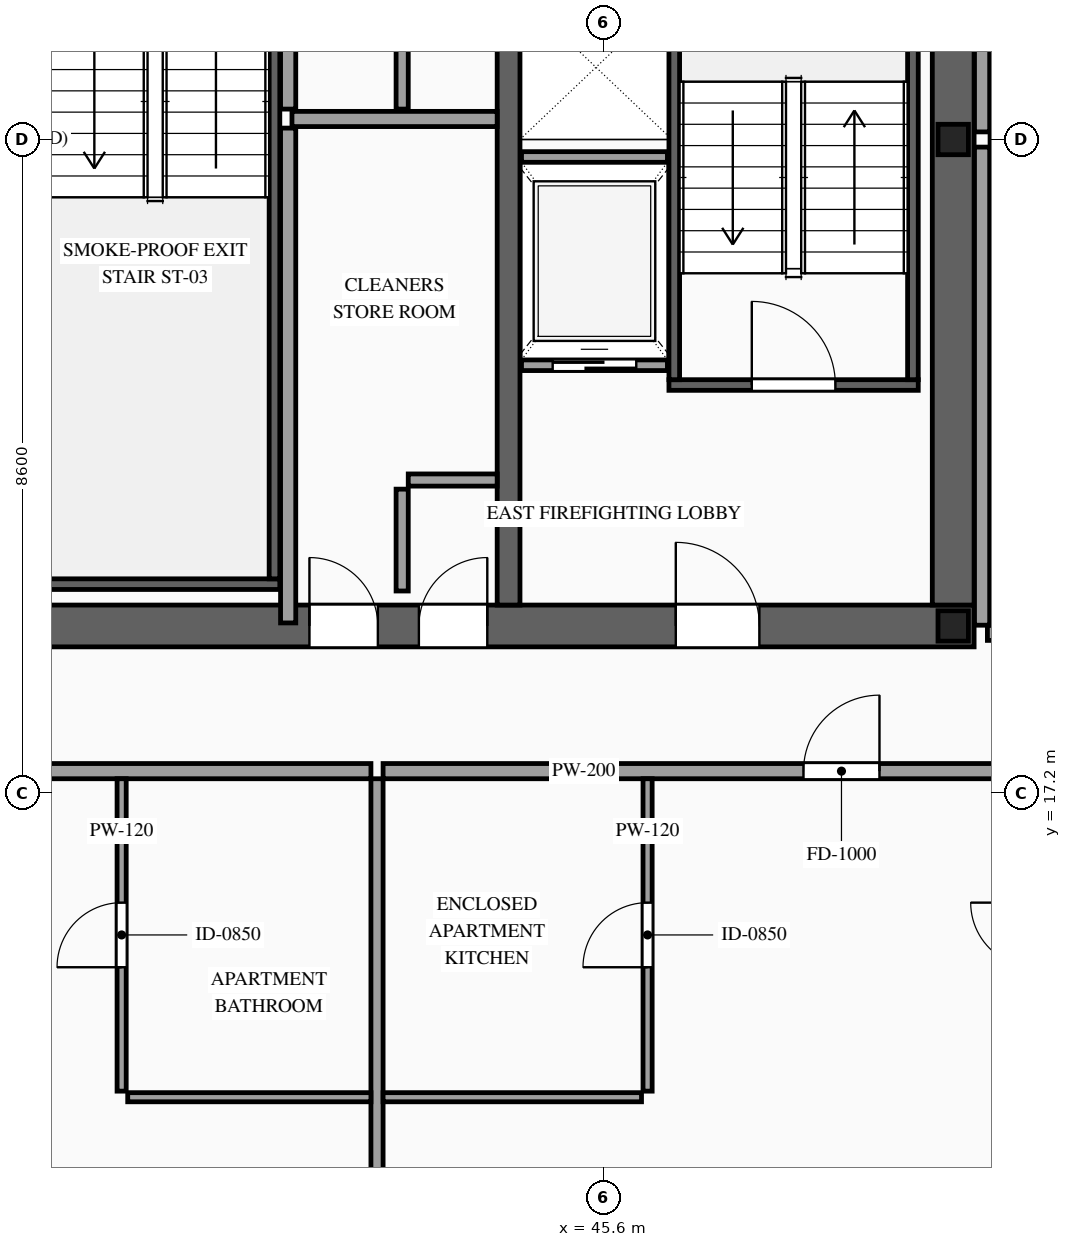
"""IFC4 building model, lengths in metres.
Left out: names, types, materials, properties, quantities, classifications, styles, units other than length and angle.
Written with IfcOpenShell. Run it as: python <this file> out.ifc"""

import sys

from ifc_helpers import new_model, si_unit, direction, frame, frame_2d, origin, origin_2d, place, context, subcontext, project, spatial, rectangle, i_section, extrude, source, transform, mapped, element, fill, save


model = new_model("IFC4")
c1 = context("Model", 3, precision=1e-05, world=origin(), true_north=direction((0.0, 1.0)))
c2 = subcontext(c1, "Body", "Model", "MODEL_VIEW")
j1 = project(units=[si_unit("LENGTHUNIT", "METRE"), si_unit("PLANEANGLEUNIT", "RADIAN")], contexts=[c1])
p1 = place(None, origin())
s1 = spatial("IfcSite", under=j1, at=p1, CompositionType="ELEMENT")
p2 = place(p1, origin())
s2 = spatial("IfcBuilding", under=s1, at=p2, CompositionType="ELEMENT")
p3 = place(p2, frame((0.0, 0.0, 234.6)))
s3 = spatial("IfcBuildingStorey", under=s2, at=p3, CompositionType="ELEMENT", Elevation=234.6)
p4 = place(p3, frame((23.525, 19.4, 0.0), z_axis=(0.0, 0.0, 1.0), x_axis=(1.0, 0.0, 0.0)))
e1 = element("IfcWall", 1, at=p4, inside=s3, PredefinedType="SHEAR", context=c2, shape_type="SweptSolid", body=[
    extrude(rectangle(XDim=26.95, YDim=0.55, at=frame_2d((13.475, 0.0))), origin(), (0.0, 0.0, 1.0), 3.5),
])
p5 = place(p4, frame((1.925, 0.0, 0.0)))
e2 = element("IfcOpeningElement", 2, at=p5, cuts=e1, PredefinedType="OPENING", context=c2, shape_type="SweptSolid", body=[
    extrude(rectangle(XDim=1.1, YDim=2.2, at=frame_2d((0.55, 1.1))), frame((0.0, 0.29, 0.0), z_axis=(0.0, -1.0, 0.0), x_axis=(1.0, 0.0, 0.0)), (0.0, 0.0, 1.0), 0.58),
])
p6 = place(p4, frame((9.825, 0.0, 0.0)))
e3 = element("IfcOpeningElement", 3, at=p6, cuts=e1, PredefinedType="OPENING", context=c2, shape_type="SweptSolid", body=[
    extrude(rectangle(XDim=1.1, YDim=2.2, at=frame_2d((0.55, 1.1))), frame((0.0, 0.29, 0.0), z_axis=(0.0, -1.0, 0.0), x_axis=(1.0, 0.0, 0.0)), (0.0, 0.0, 1.0), 0.58),
])
p7 = place(p4, frame((23.025, 0.0, 0.0)))
e4 = element("IfcOpeningElement", 4, at=p7, cuts=e1, PredefinedType="OPENING", context=c2, shape_type="SweptSolid", body=[
    extrude(rectangle(XDim=1.1, YDim=2.2, at=frame_2d((0.55, 1.1))), frame((0.0, 0.29, 0.0), z_axis=(0.0, -1.0, 0.0), x_axis=(1.0, 0.0, 0.0)), (0.0, 0.0, 1.0), 0.58),
])
p8 = place(p4, frame((19.645, 0.0, 0.0)))
e5 = element("IfcOpeningElement", 5, at=p8, cuts=e1, PredefinedType="OPENING", context=c2, shape_type="SweptSolid", body=[
    extrude(rectangle(XDim=0.9, YDim=2.15, at=frame_2d((0.45, 1.075))), frame((0.0, 0.29, 0.0), z_axis=(0.0, -1.0, 0.0), x_axis=(1.0, 0.0, 0.0)), (0.0, 0.0, 1.0), 0.58),
])
p9 = place(p4, frame((18.205, 0.0, 0.0)))
e6 = element("IfcOpeningElement", 6, at=p9, cuts=e1, PredefinedType="OPENING", context=c2, shape_type="SweptSolid", body=[
    extrude(rectangle(XDim=0.9, YDim=2.15, at=frame_2d((0.45, 1.075))), frame((0.0, 0.29, 0.0), z_axis=(0.0, -1.0, 0.0), x_axis=(1.0, 0.0, 0.0)), (0.0, 0.0, 1.0), 0.58),
])
m1 = source(origin(), c2, "Body", "SweptSolid", [
    extrude(rectangle(XDim=12.25, YDim=0.55, at=frame_2d((6.125, 0.0))), origin(), (0.0, 0.0, 1.0), 3.5),
])
p10 = place(p3, frame((50.2, 19.675, 0.0), z_axis=(0.0, 0.0, 1.0), x_axis=(0.0, 1.0, 0.0)))
e7 = element("IfcWall", 7, at=p10, inside=s3, PredefinedType="SHEAR", context=c2, shape_type="MappedRepresentation", body=[
    mapped(m1, transform((0.0, 0.0, 0.0), scale=1.0)),
])
m2 = source(origin(), c2, "Body", "SweptSolid", [
    extrude(rectangle(XDim=12.25, YDim=0.3, at=frame_2d((6.125, 0.0))), origin(), (0.0, 0.0, 1.0), 3.5),
])
p11 = place(p3, frame((44.35, 19.675, 0.0), z_axis=(0.0, 0.0, 1.0), x_axis=(0.0, 1.0, 0.0)))
e8 = element("IfcWall", 8, at=p11, inside=s3, PredefinedType="SOLIDWALL", context=c2, shape_type="MappedRepresentation", body=[
    mapped(m2, transform((0.0, 0.0, 0.0), scale=1.0)),
])
m3 = source(origin(), c2, "Body", "SweptSolid", [
    extrude(i_section(OverallWidth=0.4, OverallDepth=0.4, WebThickness=0.013, FlangeThickness=0.021, at=origin_2d()), origin(), (0.0, 0.0, 1.0), 3.5),
])
for number, where, z_axis, x_axis in (
    (9, (50.2, 19.4, 0.0), (0.0, 0.0, 1.0), (1.0, 0.0, 0.0)),
    (10, (50.2, 25.8, 0.0), (0.0, 0.0, 1.0), (1.0, 0.0, 0.0)),
):
    element("IfcColumn", number, at=place(p3, frame(where, z_axis=z_axis, x_axis=x_axis)), inside=s3, PredefinedType="COLUMN", context=c2, shape_type="MappedRepresentation", body=[
        mapped(m3, transform((0.0, 0.0, 0.0), scale=1.0)),
    ])
p12 = place(p3, frame((44.52, 22.83, 0.0), z_axis=(0.0, 0.0, 1.0), x_axis=(1.0, 0.0, 0.0)))
e11 = element("IfcWall", 11, at=p12, inside=s3, PredefinedType="SOLIDWALL", context=c2, shape_type="SweptSolid", body=[
    extrude(rectangle(XDim=1.92, YDim=0.14, at=frame_2d((0.96, 0.0))), origin(), (0.0, 0.0, 1.0), 3.28),
])
p13 = place(p12, frame((0.41, 0.0, 0.0)))
e12 = element("IfcOpeningElement", 12, at=p13, cuts=e11, PredefinedType="OPENING", context=c2, shape_type="SweptSolid", body=[
    extrude(rectangle(XDim=1.1, YDim=2.2, at=frame_2d((0.55, 1.1))), frame((0.0, 0.085, 0.0), z_axis=(0.0, -1.0, 0.0), x_axis=(1.0, 0.0, 0.0)), (0.0, 0.0, 1.0), 0.17),
])
m4 = source(origin(), c2, "Body", "SweptSolid", [
    extrude(rectangle(XDim=1.92, YDim=0.14, at=frame_2d((0.96, 0.0))), origin(), (0.0, 0.0, 1.0), 3.28),
])
p14 = place(p3, frame((44.52, 25.57, 0.0), z_axis=(0.0, 0.0, 1.0), x_axis=(1.0, 0.0, 0.0)))
e13 = element("IfcWall", 13, at=p14, inside=s3, PredefinedType="SOLIDWALL", context=c2, shape_type="MappedRepresentation", body=[
    mapped(m4, transform((0.0, 0.0, 0.0), scale=1.0)),
])
p15 = place(p3, frame((46.46, 22.57, 0.0), z_axis=(0.0, 0.0, 1.0), x_axis=(1.0, 0.0, 0.0)))
e14 = element("IfcWall", 14, at=p15, inside=s3, PredefinedType="SOLIDWALL", context=c2, shape_type="SweptSolid", body=[
    extrude(rectangle(XDim=3.28, YDim=0.14, at=frame_2d((1.64, 0.0))), origin(), (0.0, 0.0, 1.0), 3.28),
])
p16 = place(p15, frame((1.09, 0.0, 0.0)))
e15 = element("IfcOpeningElement", 15, at=p16, cuts=e14, PredefinedType="OPENING", context=c2, shape_type="SweptSolid", body=[
    extrude(rectangle(XDim=1.1, YDim=2.2, at=frame_2d((0.55, 1.1))), frame((0.0, 0.085, 0.0), z_axis=(0.0, -1.0, 0.0), x_axis=(1.0, 0.0, 0.0)), (0.0, 0.0, 1.0), 0.17),
])
m5 = source(origin(), c2, "Body", "SweptSolid", [
    extrude(rectangle(XDim=8.94, YDim=0.14, at=frame_2d((4.47, 0.0))), origin(), (0.0, 0.0, 1.0), 3.28),
])
for number, where, z_axis, x_axis in (
    (16, (46.53, 22.64, 0.0), (0.0, 0.0, 1.0), (0.0, 1.0, 0.0)),
    (17, (49.67, 22.64, 0.0), (0.0, 0.0, 1.0), (0.0, 1.0, 0.0)),
):
    element("IfcWall", number, at=place(p3, frame(where, z_axis=z_axis, x_axis=x_axis)), inside=s3, PredefinedType="SOLIDWALL", context=c2, shape_type="MappedRepresentation", body=[
        mapped(m5, transform((0.0, 0.0, 0.0), scale=1.0)),
    ])
m6 = source(origin(), c2, "Body", "SweptSolid", [
    extrude(rectangle(XDim=3.14, YDim=0.14, at=frame_2d((1.57, 0.0))), origin(), (0.0, 0.0, 1.0), 3.28),
])
p17 = place(p3, frame((38.2, 19.95, 0.0), z_axis=(0.0, 0.0, 1.0), x_axis=(1.0, 0.0, 0.0)))
e18 = element("IfcWall", 18, at=p17, inside=s3, PredefinedType="SOLIDWALL", context=c2, shape_type="MappedRepresentation", body=[
    mapped(m6, transform((0.0, 0.0, 0.0), scale=1.0)),
])
m7 = source(origin(), c2, "Body", "SweptSolid", [
    extrude(rectangle(XDim=8.94, YDim=0.14, at=frame_2d((4.47, 0.0))), origin(), (0.0, 0.0, 1.0), 3.28),
])
p18 = place(p3, frame((41.27, 20.02, 0.0), z_axis=(0.0, 0.0, 1.0), x_axis=(0.0, 1.0, 0.0)))
e19 = element("IfcWall", 19, at=p18, inside=s3, PredefinedType="SOLIDWALL", context=c2, shape_type="MappedRepresentation", body=[
    mapped(m7, transform((0.0, 0.0, 0.0), scale=1.0)),
])
m8 = source(origin(), c2, "Body", "SweptSolid", [
    extrude(rectangle(XDim=1.34, YDim=0.16, at=frame_2d((0.67, 0.0))), origin(), (0.0, 0.0, 1.0), 3.28),
])
p19 = place(p3, frame((42.95, 19.86, 0.0), z_axis=(0.0, 0.0, 1.0), x_axis=(0.0, 1.0, 0.0)))
e20 = element("IfcWall", 20, at=p19, inside=s3, PredefinedType="PARTITIONING", context=c2, shape_type="MappedRepresentation", body=[
    mapped(m8, transform((0.0, 0.0, 0.0), scale=1.0)),
])
m9 = source(origin(), c2, "Body", "SweptSolid", [
    extrude(rectangle(XDim=1.17, YDim=0.16, at=frame_2d((0.585, 0.0))), origin(), (0.0, 0.0, 1.0), 3.28),
])
p20 = place(p3, frame((43.03, 21.32, 0.0), z_axis=(0.0, 0.0, 1.0), x_axis=(1.0, 0.0, 0.0)))
e21 = element("IfcWall", 21, at=p20, inside=s3, PredefinedType="PARTITIONING", context=c2, shape_type="MappedRepresentation", body=[
    mapped(m9, transform((0.0, 0.0, 0.0), scale=1.0)),
])
m10 = source(origin(), c2, "Body", "SweptSolid", [
    extrude(rectangle(XDim=6.51, YDim=0.2, at=frame_2d((3.255, 0.0))), origin(), (0.0, 0.0, 1.0), 3.28),
])
p21 = place(p3, frame((41.45, 19.44, 0.0), z_axis=(0.0, 0.0, 1.0), x_axis=(0.0, 1.0, 0.0)))
e22 = element("IfcWall", 22, at=p21, inside=s3, PredefinedType="PARTITIONING", context=c2, shape_type="MappedRepresentation", body=[
    mapped(m10, transform((0.0, 0.0, 0.0), scale=1.0)),
])
m11 = source(origin(), c2, "Body", "SweptSolid", [
    extrude(rectangle(XDim=2.7, YDim=0.2, at=frame_2d((1.35, 0.0))), origin(), (0.0, 0.0, 1.0), 3.28),
])
p22 = place(p3, frame((41.5, 26.07, 0.0), z_axis=(0.0, 0.0, 1.0), x_axis=(1.0, 0.0, 0.0)))
e23 = element("IfcWall", 23, at=p22, inside=s3, PredefinedType="PARTITIONING", context=c2, shape_type="MappedRepresentation", body=[
    mapped(m11, transform((0.0, 0.0, 0.0), scale=1.0)),
])
m12 = source(origin(), c2, "Body", "SweptSolid", [
    extrude(rectangle(XDim=5.96, YDim=0.2, at=frame_2d((2.98, 0.0))), origin(), (0.0, 0.0, 1.0), 3.28),
])
p23 = place(p3, frame((41.45, 26.2, 0.0), z_axis=(0.0, 0.0, 1.0), x_axis=(0.0, 1.0, 0.0)))
e24 = element("IfcWall", 24, at=p23, inside=s3, PredefinedType="PARTITIONING", context=c2, shape_type="MappedRepresentation", body=[
    mapped(m12, transform((0.0, 0.0, 0.0), scale=1.0)),
])
m13 = source(origin(), c2, "Body", "SweptSolid", [
    extrude(rectangle(XDim=5.96, YDim=0.16, at=frame_2d((2.98, 0.0))), origin(), (0.0, 0.0, 1.0), 3.28),
])
p24 = place(p3, frame((42.95, 26.2, 0.0), z_axis=(0.0, 0.0, 1.0), x_axis=(0.0, 1.0, 0.0)))
e25 = element("IfcWall", 25, at=p24, inside=s3, PredefinedType="PARTITIONING", context=c2, shape_type="MappedRepresentation", body=[
    mapped(m13, transform((0.0, 0.0, 0.0), scale=1.0)),
])
p25 = place(p3, frame((31.11, 17.49, 0.0), z_axis=(0.0, 0.0, 1.0), x_axis=(1.0, 0.0, 0.0)))
e26 = element("IfcWall", 26, at=p25, inside=s3, PredefinedType="PARTITIONING", context=c2, shape_type="SweptSolid", body=[
    extrude(rectangle(XDim=11.429, YDim=0.2, at=frame_2d((5.714, 0.0))), origin(), (0.0, 0.0, 1.0), 3.28),
])
p26 = place(p25, frame((5.314, 0.0, 0.0)))
e27 = element("IfcOpeningElement", 27, at=p26, cuts=e26, PredefinedType="OPENING", context=c2, shape_type="SweptSolid", body=[
    extrude(rectangle(XDim=1.0, YDim=2.2, at=frame_2d((0.5, 1.1))), frame((0.0, 0.115, 0.0), z_axis=(0.0, -1.0, 0.0), x_axis=(1.0, 0.0, 0.0)), (0.0, 0.0, 1.0), 0.23),
])
m14 = source(origin(), c2, "Body", "SweptSolid", [
    extrude(rectangle(XDim=12.04, YDim=0.16, at=frame_2d((6.02, 0.0))), origin(), (0.0, 0.0, 1.0), 3.28),
])
p27 = place(p3, frame((42.619, 5.35, 0.0), z_axis=(0.0, 0.0, 1.0), x_axis=(0.0, 1.0, 0.0)))
e28 = element("IfcWall", 28, at=p27, inside=s3, PredefinedType="PARTITIONING", context=c2, shape_type="MappedRepresentation", body=[
    mapped(m14, transform((0.0, 0.0, 0.0), scale=1.0)),
])
m15 = source(origin(), c2, "Body", "SweptSolid", [
    extrude(rectangle(XDim=3.2, YDim=0.12, at=frame_2d((1.6, 0.0))), origin(), (0.0, 0.0, 1.0), 3.28),
])
p28 = place(p3, frame((39.339, 13.2, 0.0), z_axis=(0.0, 0.0, 1.0), x_axis=(1.0, 0.0, 0.0)))
e29 = element("IfcWall", 29, at=p28, inside=s3, PredefinedType="PARTITIONING", context=c2, shape_type="MappedRepresentation", body=[
    mapped(m15, transform((0.0, 0.0, 0.0), scale=1.0)),
])
p29 = place(p3, frame((39.259, 13.28, 0.0), z_axis=(0.0, 0.0, 1.0), x_axis=(0.0, 1.0, 0.0)))
e30 = element("IfcWall", 30, at=p29, inside=s3, PredefinedType="PARTITIONING", context=c2, shape_type="SweptSolid", body=[
    extrude(rectangle(XDim=4.11, YDim=0.12, at=frame_2d((2.055, 0.0))), origin(), (0.0, 0.0, 1.0), 3.28),
])
p30 = place(p29, frame((1.63, 0.0, 0.0)))
e31 = element("IfcOpeningElement", 31, at=p30, cuts=e30, PredefinedType="OPENING", context=c2, shape_type="SweptSolid", body=[
    extrude(rectangle(XDim=0.85, YDim=2.1, at=frame_2d((0.425, 1.05))), frame((0.0, 0.075, 0.0), z_axis=(0.0, -1.0, 0.0), x_axis=(1.0, 0.0, 0.0)), (0.0, 0.0, 1.0), 0.15),
])
p31 = place(p3, frame((42.699, 17.49, 0.0), z_axis=(0.0, 0.0, 1.0), x_axis=(1.0, 0.0, 0.0)))
e32 = element("IfcWall", 32, at=p31, inside=s3, PredefinedType="PARTITIONING", context=c2, shape_type="SweptSolid", body=[
    extrude(rectangle(XDim=11.861, YDim=0.2, at=frame_2d((5.931, 0.0))), origin(), (0.0, 0.0, 1.0), 3.28),
])
p32 = place(p31, frame((5.531, 0.0, 0.0)))
e33 = element("IfcOpeningElement", 33, at=p32, cuts=e32, PredefinedType="OPENING", context=c2, shape_type="SweptSolid", body=[
    extrude(rectangle(XDim=1.0, YDim=2.2, at=frame_2d((0.5, 1.1))), frame((0.0, 0.115, 0.0), z_axis=(0.0, -1.0, 0.0), x_axis=(1.0, 0.0, 0.0)), (0.0, 0.0, 1.0), 0.23),
])
m16 = source(origin(), c2, "Body", "SweptSolid", [
    extrude(rectangle(XDim=3.4, YDim=0.12, at=frame_2d((1.7, 0.0))), origin(), (0.0, 0.0, 1.0), 3.28),
])
p33 = place(p3, frame((42.699, 13.2, 0.0), z_axis=(0.0, 0.0, 1.0), x_axis=(1.0, 0.0, 0.0)))
e34 = element("IfcWall", 34, at=p33, inside=s3, PredefinedType="PARTITIONING", context=c2, shape_type="MappedRepresentation", body=[
    mapped(m16, transform((0.0, 0.0, 0.0), scale=1.0)),
])
p34 = place(p3, frame((46.179, 13.28, 0.0), z_axis=(0.0, 0.0, 1.0), x_axis=(0.0, 1.0, 0.0)))
e35 = element("IfcWall", 35, at=p34, inside=s3, PredefinedType="PARTITIONING", context=c2, shape_type="SweptSolid", body=[
    extrude(rectangle(XDim=4.11, YDim=0.12, at=frame_2d((2.055, 0.0))), origin(), (0.0, 0.0, 1.0), 3.28),
])
p35 = place(p34, frame((1.63, 0.0, 0.0)))
e36 = element("IfcOpeningElement", 36, at=p35, cuts=e35, PredefinedType="OPENING", context=c2, shape_type="SweptSolid", body=[
    extrude(rectangle(XDim=0.85, YDim=2.1, at=frame_2d((0.425, 1.05))), frame((0.0, 0.075, 0.0), z_axis=(0.0, -1.0, 0.0), x_axis=(1.0, 0.0, 0.0)), (0.0, 0.0, 1.0), 0.15),
])
p36 = place(p3, frame((50.65, 19.31, 0.0), z_axis=(0.0, 0.0, 1.0), x_axis=(1.0, 0.0, 0.0)))
e37 = element("IfcWall", 37, at=p36, inside=s3, PredefinedType="PARTITIONING", context=c2, shape_type="SweptSolid", body=[
    extrude(rectangle(XDim=6.8, YDim=0.2, at=frame_2d((3.4, 0.0))), origin(), (0.0, 0.0, 1.0), 2.825),
])
p37 = place(p36, frame((2.8, 0.0, 0.0)))
e38 = element("IfcOpeningElement", 38, at=p37, cuts=e37, PredefinedType="OPENING", context=c2, shape_type="SweptSolid", body=[
    extrude(rectangle(XDim=1.0, YDim=2.2, at=frame_2d((0.5, 1.1))), frame((0.0, 0.115, 0.0), z_axis=(0.0, -1.0, 0.0), x_axis=(1.0, 0.0, 0.0)), (0.0, 0.0, 1.0), 0.23),
])
m17 = source(origin(), c2, "Body", "SweptSolid", [
    extrude(rectangle(XDim=6.765, YDim=0.2, at=frame_2d((3.382, 0.0))), origin(), (0.0, 0.0, 1.0), 2.787),
])
p38 = place(p3, frame((50.685, 25.8, 0.0), z_axis=(0.0, 0.0, 1.0), x_axis=(1.0, 0.0, 0.0)))
e39 = element("IfcWall", 39, at=p38, inside=s3, PredefinedType="PARTITIONING", context=c2, shape_type="MappedRepresentation", body=[
    mapped(m17, transform((0.0, 0.0, 0.0), scale=1.0)),
])
m18 = source(origin(), c2, "Body", "SweptSolid", [
    extrude(rectangle(XDim=6.29, YDim=0.2, at=frame_2d((3.145, 0.0))), origin(), (0.0, 0.0, 1.0), 3.28),
])
for number, where, z_axis, x_axis in (
    (40, (50.58, 19.41, 0.0), (0.0, 0.0, 1.0), (0.0, 1.0, 0.0)),
    (41, (50.58, 25.9, 0.0), (0.0, 0.0, 1.0), (0.0, 1.0, 0.0)),
):
    element("IfcWall", number, at=place(p3, frame(where, z_axis=z_axis, x_axis=x_axis)), inside=s3, PredefinedType="PARTITIONING", context=c2, shape_type="MappedRepresentation", body=[
        mapped(m18, transform((0.0, 0.0, 0.0), scale=1.0)),
    ])
m19 = source(origin(), c2, "Body", "SweptSolid", [
    extrude(rectangle(XDim=1.1, YDim=2.2, at=frame_2d((0.55, 1.1))), frame((0.0, 0.025, 0.0), z_axis=(0.0, -1.0, 0.0), x_axis=(1.0, 0.0, 0.0)), (0.0, 0.0, 1.0), 0.05),
])
p39 = place(p13, origin())
e42 = element("IfcDoor", 42, at=p39, inside=s3, OperationType="SLIDING_TO_RIGHT", PredefinedType="DOOR", context=c2, shape_type="MappedRepresentation", body=[
    mapped(m19, transform((0.0, 0.0, 0.0), scale=1.0)),
])
fill(e12, e42)
m20 = source(origin(), c2, "Body", "SweptSolid", [
    extrude(rectangle(XDim=1.1, YDim=2.2, at=frame_2d((0.55, 1.1))), frame((0.0, 0.025, 0.0), z_axis=(0.0, -1.0, 0.0), x_axis=(1.0, 0.0, 0.0)), (0.0, 0.0, 1.0), 0.05),
])
p40 = place(p16, origin())
e43 = element("IfcDoor", 43, at=p40, inside=s3, OperationType="SINGLE_SWING_LEFT", PredefinedType="DOOR", context=c2, shape_type="MappedRepresentation", body=[
    mapped(m20, transform((0.0, 0.0, 0.0), scale=1.0)),
])
fill(e15, e43)
p41 = place(p7, origin())
e44 = element("IfcDoor", 44, at=p41, inside=s3, OperationType="SINGLE_SWING_LEFT", PredefinedType="DOOR", context=c2, shape_type="MappedRepresentation", body=[
    mapped(m20, transform((0.0, 0.0, 0.0), scale=1.0)),
])
fill(e4, e44)
m21 = source(origin(), c2, "Body", "SweptSolid", [
    extrude(rectangle(XDim=0.9, YDim=2.15, at=frame_2d((0.45, 1.075))), frame((0.0, 0.025, 0.0), z_axis=(0.0, -1.0, 0.0), x_axis=(1.0, 0.0, 0.0)), (0.0, 0.0, 1.0), 0.05),
])
p42 = place(p8, origin())
e45 = element("IfcDoor", 45, at=p42, inside=s3, OperationType="SINGLE_SWING_RIGHT", PredefinedType="DOOR", context=c2, shape_type="MappedRepresentation", body=[
    mapped(m21, transform((0.0, 0.0, 0.0), scale=1.0)),
])
fill(e5, e45)
p43 = place(p9, origin())
e46 = element("IfcDoor", 46, at=p43, inside=s3, OperationType="SINGLE_SWING_LEFT", PredefinedType="DOOR", context=c2, shape_type="MappedRepresentation", body=[
    mapped(m21, transform((0.0, 0.0, 0.0), scale=1.0)),
])
fill(e6, e46)
m22 = source(origin(), c2, "Body", "SweptSolid", [
    extrude(rectangle(XDim=0.85, YDim=2.1, at=frame_2d((0.425, 1.05))), frame((0.0, 0.025, 0.0), z_axis=(0.0, -1.0, 0.0), x_axis=(1.0, 0.0, 0.0)), (0.0, 0.0, 1.0), 0.05),
])
p44 = place(p30, origin())
e47 = element("IfcDoor", 47, at=p44, inside=s3, OperationType="SINGLE_SWING_LEFT", PredefinedType="DOOR", context=c2, shape_type="MappedRepresentation", body=[
    mapped(m22, transform((0.0, 0.0, 0.0), scale=1.0)),
])
fill(e31, e47)
m23 = source(origin(), c2, "Body", "SweptSolid", [
    extrude(rectangle(XDim=1.0, YDim=2.2, at=frame_2d((0.5, 1.1))), frame((0.0, 0.025, 0.0), z_axis=(0.0, -1.0, 0.0), x_axis=(1.0, 0.0, 0.0)), (0.0, 0.0, 1.0), 0.05),
])
p45 = place(p32, origin())
e48 = element("IfcDoor", 48, at=p45, inside=s3, OperationType="SINGLE_SWING_RIGHT", PredefinedType="DOOR", context=c2, shape_type="MappedRepresentation", body=[
    mapped(m23, transform((0.0, 0.0, 0.0), scale=1.0)),
])
fill(e33, e48)
p46 = place(p35, origin())
e49 = element("IfcDoor", 49, at=p46, inside=s3, OperationType="SINGLE_SWING_LEFT", PredefinedType="DOOR", context=c2, shape_type="MappedRepresentation", body=[
    mapped(m22, transform((0.0, 0.0, 0.0), scale=1.0)),
])
fill(e36, e49)
save(model, sys.argv[1])
